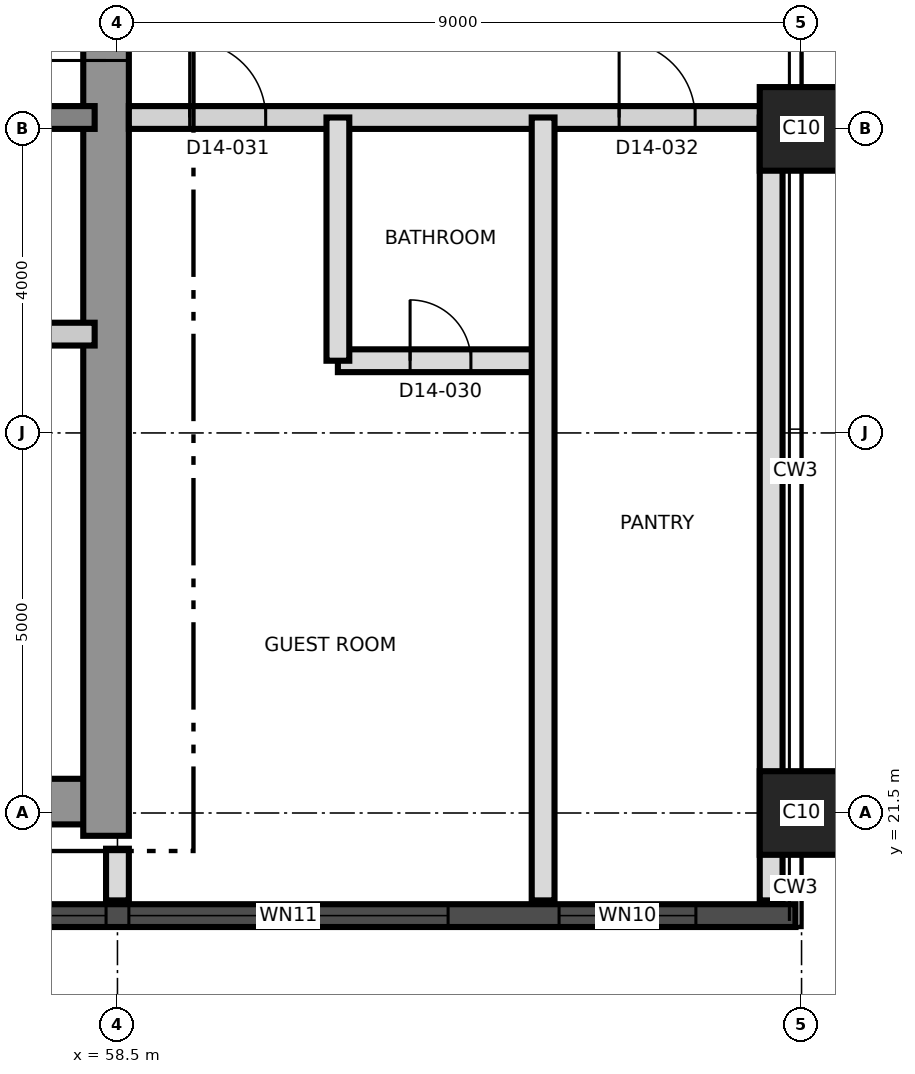
"""IFC4 building model, lengths in metres.
Left out: names, types, materials, properties, quantities, classifications, styles, units other than length and angle.
Written with IfcOpenShell. Run it as: python <this file> out.ifc"""

import sys

from ifc_helpers import new_model, si_unit, direction, frame, frame_2d, origin, origin_2d, place, context, subcontext, project, spatial, rectangle, extrude, element, fill, save


model = new_model("IFC4")
c1 = context("Model", 3, precision=1e-05, world=origin(), true_north=direction((0.0, 1.0)))
c2 = subcontext(c1, "Body", "Model", "MODEL_VIEW")
j1 = project(units=[si_unit("LENGTHUNIT", "METRE"), si_unit("PLANEANGLEUNIT", "RADIAN")], contexts=[c1])
p1 = place(None, origin())
s1 = spatial("IfcSite", under=j1, at=p1, CompositionType="ELEMENT")
p2 = place(p1, origin())
s2 = spatial("IfcBuilding", under=s1, at=p2, CompositionType="ELEMENT")
p3 = place(p2, frame((0.0, 0.0, 149.6)))
s3 = spatial("IfcBuildingStorey", under=s2, at=p3, CompositionType="ELEMENT", Elevation=149.6)
p4 = place(p3, frame((31.2, 21.65, 0.0), z_axis=(0.0, 0.0, 1.0), x_axis=(1.0, 0.0, 0.0)))
e1 = element("IfcWall", 1, at=p4, inside=s3, PredefinedType="SHEAR", context=c2, shape_type="SweptSolid", body=[
    extrude(rectangle(XDim=27.0, YDim=0.6, at=frame_2d((13.5, 0.0))), origin(), (0.0, 0.0, 1.0), 3.7),
])
p5 = place(p3, frame((58.35, 21.2, 0.0), z_axis=(0.0, 0.0, 1.0), x_axis=(0.0, 1.0, 0.0)))
e2 = element("IfcWall", 2, at=p5, inside=s3, PredefinedType="SHEAR", context=c2, shape_type="SweptSolid", body=[
    extrude(rectangle(XDim=18.6, YDim=0.6, at=frame_2d((9.3, 0.0))), origin(), (0.0, 0.0, 1.0), 3.7),
])
p6 = place(p5, frame((10.2, 0.0, 0.0)))
e3 = element("IfcOpeningElement", 3, at=p6, cuts=e2, PredefinedType="OPENING", context=c2, shape_type="SweptSolid", body=[
    extrude(rectangle(XDim=1.2, YDim=2.1, at=frame_2d((0.6, 1.05))), frame((0.0, 0.31, 0.0), z_axis=(0.0, -1.0, 0.0), x_axis=(1.0, 0.0, 0.0)), (0.0, 0.0, 1.0), 0.62),
])
p7 = place(p3, frame((31.8, 30.65, 0.0), z_axis=(0.0, 0.0, 1.0), x_axis=(1.0, 0.0, 0.0)))
e4 = element("IfcWall", 4, at=p7, inside=s3, PredefinedType="SHEAR", context=c2, shape_type="SweptSolid", body=[
    extrude(rectangle(XDim=26.4, YDim=0.3, at=frame_2d((13.2, 0.0))), origin(), (0.0, 0.0, 1.0), 3.7),
])
p8 = place(p7, frame((24.7, 0.0, 0.0)))
e5 = element("IfcOpeningElement", 5, at=p8, cuts=e4, PredefinedType="OPENING", context=c2, shape_type="SweptSolid", body=[
    extrude(rectangle(XDim=1.0, YDim=2.1, at=frame_2d((0.5, 1.05))), frame((0.0, 0.16, 0.0), z_axis=(0.0, -1.0, 0.0), x_axis=(1.0, 0.0, 0.0)), (0.0, 0.0, 1.0), 0.32),
])
p9 = place(p7, frame((4.0, 0.0, 0.0)))
e6 = element("IfcOpeningElement", 6, at=p9, cuts=e4, PredefinedType="OPENING", context=c2, shape_type="SweptSolid", body=[
    extrude(rectangle(XDim=1.0, YDim=2.1, at=frame_2d((0.5, 1.05))), frame((0.0, 0.16, 0.0), z_axis=(0.0, -1.0, 0.0), x_axis=(1.0, 0.0, 0.0)), (0.0, 0.0, 1.0), 0.32),
])
for number, where, z_axis, x_axis in (
    (7, (67.5, 21.5, 0.0), (0.0, 0.0, 1.0), (1.0, 0.0, 0.0)),
    (8, (67.5, 30.5, 0.0), (0.0, 0.0, 1.0), (1.0, 0.0, 0.0)),
):
    element("IfcColumn", number, at=place(p3, frame(where, z_axis=z_axis, x_axis=x_axis)), inside=s3, PredefinedType="COLUMN", context=c2, shape_type="SweptSolid", body=[
        extrude(rectangle(XDim=1.1, YDim=1.1, at=origin_2d()), origin(), (0.0, 0.0, 1.0), 3.7),
    ])
p10 = place(p3, frame((44.011, 20.15, 0.0), z_axis=(0.0, 0.0, 1.0), x_axis=(1.0, 0.0, 0.0)))
e9 = element("IfcWall", 9, at=p10, inside=s3, PredefinedType="SOLIDWALL", context=c2, shape_type="SweptSolid", body=[
    extrude(rectangle(XDim=23.409, YDim=0.3, at=frame_2d((11.705, 0.0))), origin(), (0.0, 0.0, 1.0), 3.4),
])
p11 = place(p10, frame((1.845, 0.0, 0.3)))
e10 = element("IfcOpeningElement", 10, at=p11, cuts=e9, PredefinedType="OPENING", context=c2, shape_type="SweptSolid", body=[
    extrude(rectangle(XDim=1.8, YDim=2.4, at=frame_2d((0.9, 1.2))), frame((0.0, 0.16, 0.0), z_axis=(0.0, -1.0, 0.0), x_axis=(1.0, 0.0, 0.0)), (0.0, 0.0, 1.0), 0.32),
])
p12 = place(p10, frame((5.639, 0.0, 0.9)))
e11 = element("IfcOpeningElement", 11, at=p12, cuts=e9, PredefinedType="OPENING", context=c2, shape_type="SweptSolid", body=[
    extrude(rectangle(XDim=4.2, YDim=1.5, at=frame_2d((2.1, 0.75))), frame((0.0, 0.16, 0.0), z_axis=(0.0, -1.0, 0.0), x_axis=(1.0, 0.0, 0.0)), (0.0, 0.0, 1.0), 0.32),
])
p13 = place(p10, frame((10.139, 0.0, 0.9)))
e12 = element("IfcOpeningElement", 12, at=p13, cuts=e9, PredefinedType="OPENING", context=c2, shape_type="SweptSolid", body=[
    extrude(rectangle(XDim=4.2, YDim=1.5, at=frame_2d((2.1, 0.75))), frame((0.0, 0.16, 0.0), z_axis=(0.0, -1.0, 0.0), x_axis=(1.0, 0.0, 0.0)), (0.0, 0.0, 1.0), 0.32),
])
p14 = place(p10, frame((14.639, 0.0, 0.9)))
e13 = element("IfcOpeningElement", 13, at=p14, cuts=e9, PredefinedType="OPENING", context=c2, shape_type="SweptSolid", body=[
    extrude(rectangle(XDim=4.2, YDim=1.5, at=frame_2d((2.1, 0.75))), frame((0.0, 0.16, 0.0), z_axis=(0.0, -1.0, 0.0), x_axis=(1.0, 0.0, 0.0)), (0.0, 0.0, 1.0), 0.32),
])
p15 = place(p10, frame((20.299, 0.0, 0.3)))
e14 = element("IfcOpeningElement", 14, at=p15, cuts=e9, PredefinedType="OPENING", context=c2, shape_type="SweptSolid", body=[
    extrude(rectangle(XDim=1.8, YDim=2.4, at=frame_2d((0.9, 1.2))), frame((0.0, 0.16, 0.0), z_axis=(0.0, -1.0, 0.0), x_axis=(1.0, 0.0, 0.0)), (0.0, 0.0, 1.0), 0.32),
])
p16 = place(p3, frame((55.8, 27.8, 0.0), z_axis=(0.0, 0.0, 1.0), x_axis=(1.0, 0.0, 0.0)))
e15 = element("IfcWall", 15, at=p16, inside=s3, PredefinedType="PARTITIONING", context=c2, shape_type="SweptSolid", body=[
    extrude(rectangle(XDim=2.4, YDim=0.3, at=frame_2d((1.2, 0.0))), origin(), (0.0, 0.0, 1.0), 3.4),
])
p17 = place(p16, frame((0.75, 0.0, 0.0)))
e16 = element("IfcOpeningElement", 16, at=p17, cuts=e15, PredefinedType="OPENING", context=c2, shape_type="SweptSolid", body=[
    extrude(rectangle(XDim=0.9, YDim=2.1, at=frame_2d((0.45, 1.05))), frame((0.0, 0.16, 0.0), z_axis=(0.0, -1.0, 0.0), x_axis=(1.0, 0.0, 0.0)), (0.0, 0.0, 1.0), 0.32),
])
p18 = place(p3, frame((61.4, 27.45, 0.0), z_axis=(0.0, 0.0, 1.0), x_axis=(1.0, 0.0, 0.0)))
e17 = element("IfcWall", 17, at=p18, inside=s3, PredefinedType="PARTITIONING", context=c2, shape_type="SweptSolid", body=[
    extrude(rectangle(XDim=2.7, YDim=0.3, at=frame_2d((1.35, 0.0))), origin(), (0.0, 0.0, 1.0), 3.4),
])
p19 = place(p18, frame((0.95, 0.0, 0.0)))
e18 = element("IfcOpeningElement", 18, at=p19, cuts=e17, PredefinedType="OPENING", context=c2, shape_type="SweptSolid", body=[
    extrude(rectangle(XDim=0.8, YDim=2.1, at=frame_2d((0.4, 1.05))), frame((0.0, 0.16, 0.0), z_axis=(0.0, -1.0, 0.0), x_axis=(1.0, 0.0, 0.0)), (0.0, 0.0, 1.0), 0.32),
])
p20 = place(p3, frame((58.65, 30.65, 0.0), z_axis=(0.0, 0.0, 1.0), x_axis=(1.0, 0.0, 0.0)))
e19 = element("IfcWall", 19, at=p20, inside=s3, PredefinedType="PARTITIONING", context=c2, shape_type="SweptSolid", body=[
    extrude(rectangle(XDim=8.5, YDim=0.3, at=frame_2d((4.25, 0.0))), origin(), (0.0, 0.0, 1.0), 3.4),
])
p21 = place(p20, frame((0.8, 0.0, 0.0)))
e20 = element("IfcOpeningElement", 20, at=p21, cuts=e19, PredefinedType="OPENING", context=c2, shape_type="SweptSolid", body=[
    extrude(rectangle(XDim=1.0, YDim=2.1, at=frame_2d((0.5, 1.05))), frame((0.0, 0.16, 0.0), z_axis=(0.0, -1.0, 0.0), x_axis=(1.0, 0.0, 0.0)), (0.0, 0.0, 1.0), 0.32),
])
p22 = place(p20, frame((6.45, 0.0, 0.0)))
e21 = element("IfcOpeningElement", 21, at=p22, cuts=e19, PredefinedType="OPENING", context=c2, shape_type="SweptSolid", body=[
    extrude(rectangle(XDim=1.0, YDim=2.1, at=frame_2d((0.5, 1.05))), frame((0.0, 0.16, 0.0), z_axis=(0.0, -1.0, 0.0), x_axis=(1.0, 0.0, 0.0)), (0.0, 0.0, 1.0), 0.32),
])
p23 = place(p3, frame((58.5, 20.35, 0.0), z_axis=(0.0, 0.0, 1.0), x_axis=(0.0, 1.0, 0.0)))
e22 = element("IfcWall", 22, at=p23, inside=s3, PredefinedType="PARTITIONING", context=c2, shape_type="SweptSolid", body=[
    extrude(rectangle(XDim=0.68, YDim=0.3, at=frame_2d((0.34, 0.0))), origin(), (0.0, 0.0, 1.0), 3.35),
])
p24 = place(p3, frame((61.4, 27.45, 0.0), z_axis=(0.0, 0.0, 1.0), x_axis=(0.0, 1.0, 0.0)))
e23 = element("IfcWall", 23, at=p24, inside=s3, PredefinedType="PARTITIONING", context=c2, shape_type="SweptSolid", body=[
    extrude(rectangle(XDim=3.2, YDim=0.3, at=frame_2d((1.6, 0.0))), origin(), (0.0, 0.0, 1.0), 3.4),
])
for number, where, z_axis, x_axis in (
    (24, (64.1, 20.35, 0.0), (0.0, 0.0, 1.0), (0.0, 1.0, 0.0)),
    (25, (67.1, 20.35, 0.0), (0.0, 0.0, 1.0), (0.0, 1.0, 0.0)),
):
    element("IfcWall", number, at=place(p3, frame(where, z_axis=z_axis, x_axis=x_axis)), inside=s3, PredefinedType="PARTITIONING", context=c2, shape_type="SweptSolid", body=[
        extrude(rectangle(XDim=10.3, YDim=0.3, at=frame_2d((5.15, 0.0))), origin(), (0.0, 0.0, 1.0), 3.35),
    ])
p25 = place(p13, origin())
e26 = element("IfcWindow", 26, at=p25, inside=s3, PartitioningType="SINGLE_PANEL", PredefinedType="WINDOW", context=c2, shape_type="SweptSolid", body=[
    extrude(rectangle(XDim=4.2, YDim=1.5, at=frame_2d((2.1, 0.75))), frame((0.0, 0.03, 0.0), z_axis=(0.0, -1.0, 0.0), x_axis=(1.0, 0.0, 0.0)), (0.0, 0.0, 1.0), 0.06),
])
fill(e12, e26)
p26 = place(p14, origin())
e27 = element("IfcWindow", 27, at=p26, inside=s3, PartitioningType="SINGLE_PANEL", PredefinedType="WINDOW", context=c2, shape_type="SweptSolid", body=[
    extrude(rectangle(XDim=4.2, YDim=1.5, at=frame_2d((2.1, 0.75))), frame((0.0, 0.03, 0.0), z_axis=(0.0, -1.0, 0.0), x_axis=(1.0, 0.0, 0.0)), (0.0, 0.0, 1.0), 0.06),
])
fill(e13, e27)
p27 = place(p15, origin())
e28 = element("IfcWindow", 28, at=p27, inside=s3, PartitioningType="SINGLE_PANEL", PredefinedType="WINDOW", context=c2, shape_type="SweptSolid", body=[
    extrude(rectangle(XDim=1.8, YDim=2.4, at=frame_2d((0.9, 1.2))), frame((0.0, 0.03, 0.0), z_axis=(0.0, -1.0, 0.0), x_axis=(1.0, 0.0, 0.0)), (0.0, 0.0, 1.0), 0.06),
])
fill(e14, e28)
p28 = place(p6, origin())
e29 = element("IfcDoor", 29, at=p28, inside=s3, OperationType="SINGLE_SWING_LEFT", PredefinedType="DOOR", context=c2, shape_type="SweptSolid", body=[
    extrude(rectangle(XDim=1.2, YDim=2.1, at=frame_2d((0.6, 1.05))), frame((0.0, 0.025, 0.0), z_axis=(0.0, -1.0, 0.0), x_axis=(1.0, 0.0, 0.0)), (0.0, 0.0, 1.0), 0.05),
])
fill(e3, e29)
p29 = place(p19, origin())
e30 = element("IfcDoor", 30, at=p29, inside=s3, OperationType="SINGLE_SWING_LEFT", PredefinedType="DOOR", context=c2, shape_type="SweptSolid", body=[
    extrude(rectangle(XDim=0.8, YDim=2.1, at=frame_2d((0.4, 1.05))), frame((0.0, 0.025, 0.0), z_axis=(0.0, -1.0, 0.0), x_axis=(1.0, 0.0, 0.0)), (0.0, 0.0, 1.0), 0.05),
])
fill(e18, e30)
p30 = place(p21, origin())
e31 = element("IfcDoor", 31, at=p30, inside=s3, OperationType="SINGLE_SWING_LEFT", PredefinedType="DOOR", context=c2, shape_type="SweptSolid", body=[
    extrude(rectangle(XDim=1.0, YDim=2.1, at=frame_2d((0.5, 1.05))), frame((0.0, 0.025, 0.0), z_axis=(0.0, -1.0, 0.0), x_axis=(1.0, 0.0, 0.0)), (0.0, 0.0, 1.0), 0.05),
])
fill(e20, e31)
p31 = place(p22, origin())
e32 = element("IfcDoor", 32, at=p31, inside=s3, OperationType="SINGLE_SWING_RIGHT", PredefinedType="DOOR", context=c2, shape_type="SweptSolid", body=[
    extrude(rectangle(XDim=1.0, YDim=2.1, at=frame_2d((0.5, 1.05))), frame((0.0, 0.025, 0.0), z_axis=(0.0, -1.0, 0.0), x_axis=(1.0, 0.0, 0.0)), (0.0, 0.0, 1.0), 0.05),
])
fill(e21, e32)
save(model, sys.argv[1])
